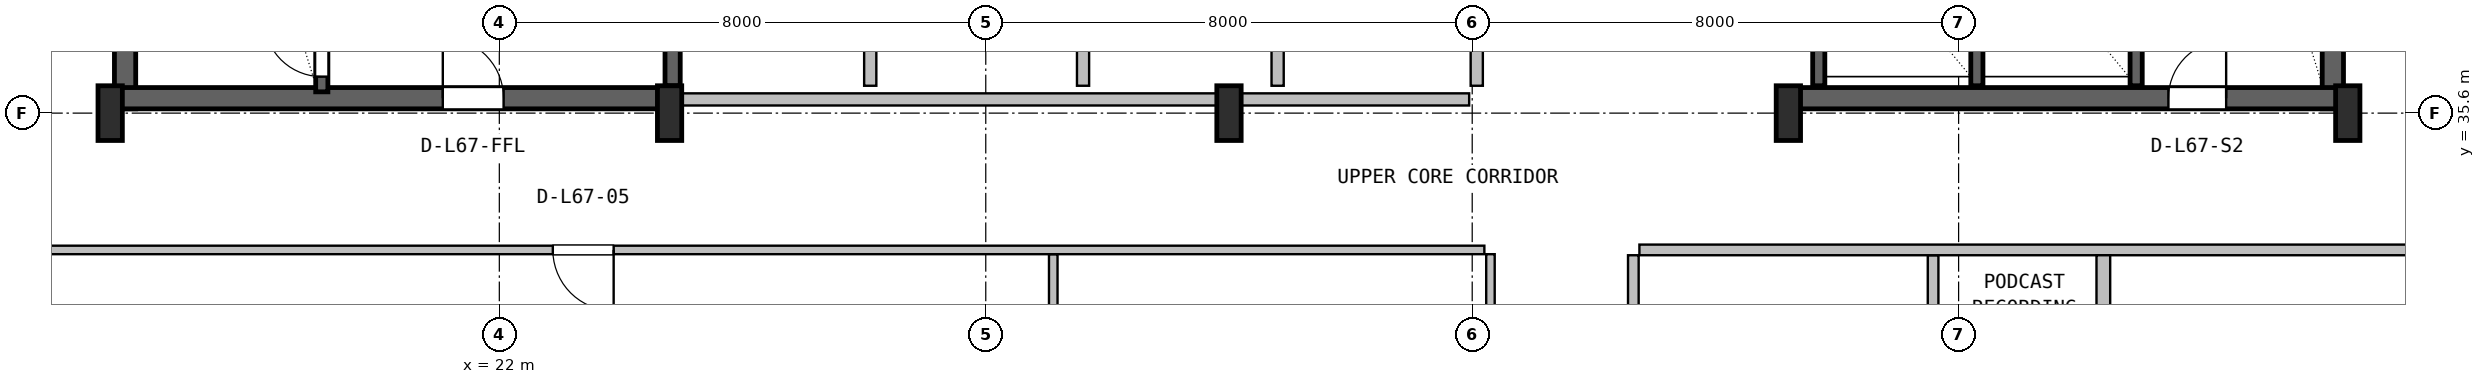
"""IFC4 building model, lengths in metres.
Left out: names, types, materials, properties, quantities, classifications, styles, units other than length and angle.
Written with IfcOpenShell. Run it as: python <this file> out.ifc"""

import sys

from ifc_helpers import new_model, si_unit, direction, frame, frame_2d, origin, origin_2d, place, context, subcontext, project, spatial, rectangle, i_section, extrude, source, transform, mapped, element, fill, save


model = new_model("IFC4")
c1 = context("Model", 3, precision=1e-05, world=origin(), true_north=direction((0.0, 1.0)))
c2 = subcontext(c1, "Body", "Model", "MODEL_VIEW")
j1 = project(units=[si_unit("LENGTHUNIT", "METRE"), si_unit("PLANEANGLEUNIT", "RADIAN")], contexts=[c1])
p1 = place(None, origin())
s1 = spatial("IfcSite", under=j1, at=p1, CompositionType="ELEMENT")
p2 = place(p1, origin())
s2 = spatial("IfcBuilding", under=s1, at=p2, CompositionType="ELEMENT")
p3 = place(p2, frame((0.0, 0.0, 269.8)))
s3 = spatial("IfcBuildingStorey", under=s2, at=p3, CompositionType="ELEMENT", Elevation=269.8)
for number, where, z_axis, x_axis in (
    (1, (15.845, 35.67, 0.0), (0.0, 0.0, 1.0), (0.0, 1.0, 0.0)),
    (2, (52.155, 35.67, 0.0), (0.0, 0.0, 1.0), (0.0, 1.0, 0.0)),
):
    element("IfcWall", number, at=place(p3, frame(where, z_axis=z_axis, x_axis=x_axis)), inside=s3, PredefinedType="SHEAR", context=c2, shape_type="SweptSolid", body=[
        extrude(rectangle(XDim=11.13, YDim=0.35, at=frame_2d((5.565, 0.0))), origin(), (0.0, 0.0, 1.0), 3.55),
    ])
p4 = place(p3, frame((15.67, 35.845, 0.0), z_axis=(0.0, 0.0, 1.0), x_axis=(1.0, 0.0, 0.0)))
e3 = element("IfcWall", 3, at=p4, inside=s3, PredefinedType="SHEAR", context=c2, shape_type="SweptSolid", body=[
    extrude(rectangle(XDim=9.13, YDim=0.35, at=frame_2d((4.565, 0.0))), origin(), (0.0, 0.0, 1.0), 3.55),
])
p5 = place(p4, frame((5.4, 0.0, 0.0)))
e4 = element("IfcOpeningElement", 4, at=p5, cuts=e3, PredefinedType="OPENING", context=c2, shape_type="SweptSolid", body=[
    extrude(rectangle(XDim=1.0, YDim=2.1, at=frame_2d((0.5, 1.05))), frame((0.0, 0.185, 0.0), z_axis=(0.0, -1.0, 0.0), x_axis=(1.0, 0.0, 0.0)), (0.0, 0.0, 1.0), 0.37),
])
p6 = place(p3, frame((43.2, 35.845, 0.0), z_axis=(0.0, 0.0, 1.0), x_axis=(1.0, 0.0, 0.0)))
e5 = element("IfcWall", 5, at=p6, inside=s3, PredefinedType="SHEAR", context=c2, shape_type="SweptSolid", body=[
    extrude(rectangle(XDim=9.13, YDim=0.35, at=frame_2d((4.565, 0.0))), origin(), (0.0, 0.0, 1.0), 3.55),
])
p7 = place(p6, frame((6.25, 0.0, 0.0)))
e6 = element("IfcOpeningElement", 6, at=p7, cuts=e5, PredefinedType="OPENING", context=c2, shape_type="SweptSolid", body=[
    extrude(rectangle(XDim=0.95, YDim=2.1, at=frame_2d((0.475, 1.05))), frame((0.0, 0.185, 0.0), z_axis=(0.0, -1.0, 0.0), x_axis=(1.0, 0.0, 0.0)), (0.0, 0.0, 1.0), 0.37),
])
m1 = source(origin(), c2, "Body", "SweptSolid", [
    extrude(i_section(OverallWidth=0.4, OverallDepth=0.9, WebThickness=0.016, FlangeThickness=0.028, FilletRadius=0.016, at=origin_2d()), origin(), (0.0, 0.0, 1.0), 3.8),
])
for number, where, z_axis, x_axis in (
    (7, (15.6, 35.6, 0.0), (0.0, 0.0, 1.0), (1.0, 0.0, 0.0)),
    (8, (24.8, 35.6, 0.0), (0.0, 0.0, 1.0), (1.0, 0.0, 0.0)),
    (9, (34.0, 35.6, 0.0), (0.0, 0.0, 1.0), (1.0, 0.0, 0.0)),
    (10, (43.2, 35.6, 0.0), (0.0, 0.0, 1.0), (1.0, 0.0, 0.0)),
    (11, (52.4, 35.6, 0.0), (0.0, 0.0, 1.0), (1.0, 0.0, 0.0)),
):
    element("IfcColumn", number, at=place(p3, frame(where, z_axis=z_axis, x_axis=x_axis)), inside=s3, PredefinedType="COLUMN", context=c2, shape_type="MappedRepresentation", body=[
        mapped(m1, transform((0.0, 0.0, 0.0), x_axis=(1.0, 0.0, 0.0), y_axis=(0.0, 1.0, 0.0), z_axis=(0.0, 0.0, 1.0), scale=1.0)),
    ])
p8 = place(p3, frame((19.08, 35.95, 0.0), z_axis=(0.0, 0.0, 1.0), x_axis=(0.0, 1.0, 0.0)))
e12 = element("IfcWall", 12, at=p8, inside=s3, PredefinedType="SHEAR", context=c2, shape_type="SweptSolid", body=[
    extrude(rectangle(XDim=9.65, YDim=0.2, at=frame_2d((4.825, 0.0))), origin(), (0.0, 0.0, 1.0), 3.55),
])
p9 = place(p8, frame((0.25, 0.0, 0.0)))
e13 = element("IfcOpeningElement", 13, at=p9, cuts=e12, PredefinedType="OPENING", context=c2, shape_type="SweptSolid", body=[
    extrude(rectangle(XDim=0.95, YDim=2.1, at=frame_2d((0.475, 1.05))), frame((0.0, 0.11, 0.0), z_axis=(0.0, -1.0, 0.0), x_axis=(1.0, 0.0, 0.0)), (0.0, 0.0, 1.0), 0.22),
])
p10 = place(p3, frame((24.85, 36.05, 0.0), z_axis=(0.0, 0.0, 1.0), x_axis=(0.0, 1.0, 0.0)))
e14 = element("IfcWall", 14, at=p10, inside=s3, PredefinedType="SHEAR", context=c2, shape_type="SweptSolid", body=[
    extrude(rectangle(XDim=10.45, YDim=0.25, at=frame_2d((5.225, 0.0))), origin(), (0.0, 0.0, 1.0), 3.55),
])
p11 = place(p3, frame((48.92, 36.05, 0.0), z_axis=(0.0, 0.0, 1.0), x_axis=(0.0, 1.0, 0.0)))
e15 = element("IfcWall", 15, at=p11, inside=s3, PredefinedType="SHEAR", context=c2, shape_type="SweptSolid", body=[
    extrude(rectangle(XDim=10.5, YDim=0.2, at=frame_2d((5.25, 0.0))), origin(), (0.0, 0.0, 1.0), 3.55),
])
for number, where, z_axis, x_axis in (
    (16, (43.7, 36.05, 0.0), (0.0, 0.0, 1.0), (0.0, 1.0, 0.0)),
    (17, (46.3, 36.05, 0.0), (0.0, 0.0, 1.0), (0.0, 1.0, 0.0)),
):
    element("IfcWall", number, at=place(p3, frame(where, z_axis=z_axis, x_axis=x_axis)), inside=s3, PredefinedType="SHEAR", context=c2, shape_type="SweptSolid", body=[
        extrude(rectangle(XDim=3.05, YDim=0.2, at=frame_2d((1.525, 0.0))), origin(), (0.0, 0.0, 1.0), 3.55),
    ])
p12 = place(p3, frame((25.0, 35.825, 0.0), z_axis=(0.0, 0.0, 1.0), x_axis=(1.0, 0.0, 0.0)))
e18 = element("IfcWall", 18, at=p12, inside=s3, PredefinedType="SOLIDWALL", context=c2, shape_type="SweptSolid", body=[
    extrude(rectangle(XDim=12.95, YDim=0.2, at=frame_2d((6.475, 0.0))), origin(), (0.0, 0.0, 1.0), 2.575),
])
for number, where, z_axis, x_axis in (
    (19, (28.1, 36.05, 0.0), (0.0, 0.0, 1.0), (0.0, 1.0, 0.0)),
    (20, (31.6, 36.05, 0.0), (0.0, 0.0, 1.0), (0.0, 1.0, 0.0)),
):
    element("IfcWall", number, at=place(p3, frame(where, z_axis=z_axis, x_axis=x_axis)), inside=s3, PredefinedType="PLUMBINGWALL", context=c2, shape_type="SweptSolid", body=[
        extrude(rectangle(XDim=3.1, YDim=0.2, at=frame_2d((1.55, 0.0))), origin(), (0.0, 0.0, 1.0), 3.53),
    ])
for number, where, z_axis, x_axis in (
    (21, (34.8, 36.05, 0.0), (0.0, 0.0, 1.0), (0.0, 1.0, 0.0)),
    (22, (38.075, 36.05, 0.0), (0.0, 0.0, 1.0), (0.0, 1.0, 0.0)),
):
    element("IfcWall", number, at=place(p3, frame(where, z_axis=z_axis, x_axis=x_axis)), inside=s3, PredefinedType="SOLIDWALL", context=c2, shape_type="SweptSolid", body=[
        extrude(rectangle(XDim=3.1, YDim=0.2, at=frame_2d((1.55, 0.0))), origin(), (0.0, 0.0, 1.0), 3.53),
    ])
p13 = place(p3, frame((38.3, 13.38, 0.0), z_axis=(0.0, 0.0, 1.0), x_axis=(0.0, 1.0, 0.0)))
e23 = element("IfcWall", 23, at=p13, inside=s3, PredefinedType="PARTITIONING", context=c2, shape_type="SweptSolid", body=[
    extrude(rectangle(XDim=19.9, YDim=0.14, at=frame_2d((9.95, 0.0))), origin(), (0.0, 0.0, 1.0), 2.981),
])
p14 = place(p13, frame((12.545, 0.0, 0.0)))
e24 = element("IfcOpeningElement", 24, at=p14, cuts=e23, PredefinedType="OPENING", context=c2, shape_type="SweptSolid", body=[
    extrude(rectangle(XDim=1.4, YDim=2.12, at=frame_2d((0.7, 1.06))), frame((0.0, 0.08, 0.0), z_axis=(0.0, -1.0, 0.0), x_axis=(1.0, 0.0, 0.0)), (0.0, 0.0, 1.0), 0.16),
])
p15 = place(p3, frame((31.11, 19.87, 0.0), z_axis=(0.0, 0.0, 1.0), x_axis=(0.0, 1.0, 0.0)))
e25 = element("IfcWall", 25, at=p15, inside=s3, PredefinedType="PARTITIONING", context=c2, shape_type="SweptSolid", body=[
    extrude(rectangle(XDim=13.41, YDim=0.14, at=frame_2d((6.705, 0.0))), origin(), (0.0, 0.0, 1.0), 2.981),
])
p16 = place(p3, frame((12.18, 33.35, 0.0), z_axis=(0.0, 0.0, 1.0), x_axis=(1.0, 0.0, 0.0)))
e26 = element("IfcWall", 26, at=p16, inside=s3, PredefinedType="PARTITIONING", context=c2, shape_type="SweptSolid", body=[
    extrude(rectangle(XDim=26.02, YDim=0.14, at=frame_2d((13.01, 0.0))), origin(), (0.0, 0.0, 1.0), 2.981),
])
p17 = place(p16, frame((10.7, 0.0, 0.0)))
e27 = element("IfcOpeningElement", 27, at=p17, cuts=e26, PredefinedType="OPENING", context=c2, shape_type="SweptSolid", body=[
    extrude(rectangle(XDim=1.0, YDim=2.1, at=frame_2d((0.5, 1.05))), frame((0.0, 0.08, 0.0), z_axis=(0.0, -1.0, 0.0), x_axis=(1.0, 0.0, 0.0)), (0.0, 0.0, 1.0), 0.16),
])
p18 = place(p3, frame((45.58, 29.167, 0.0), z_axis=(0.0, 0.0, 1.0), x_axis=(0.0, 1.0, 0.0)))
e28 = element("IfcWall", 28, at=p18, inside=s3, PredefinedType="PARTITIONING", context=c2, shape_type="SweptSolid", body=[
    extrude(rectangle(XDim=4.096, YDim=0.175, at=frame_2d((2.048, 0.0))), origin(), (0.0, 0.0, 1.0), 3.53),
])
p19 = place(p3, frame((40.75, 33.35, 0.0), z_axis=(0.0, 0.0, 1.0), x_axis=(1.0, 0.0, 0.0)))
e29 = element("IfcWall", 29, at=p19, inside=s3, PredefinedType="PARTITIONING", context=c2, shape_type="SweptSolid", body=[
    extrude(rectangle(XDim=15.07, YDim=0.175, at=frame_2d((7.535, 0.0))), origin(), (0.0, 0.0, 1.0), 2.981),
])
p20 = place(p3, frame((40.65, 29.167, 0.0), z_axis=(0.0, 0.0, 1.0), x_axis=(0.0, 1.0, 0.0)))
e30 = element("IfcWall", 30, at=p20, inside=s3, PredefinedType="PARTITIONING", context=c2, shape_type="SweptSolid", body=[
    extrude(rectangle(XDim=4.096, YDim=0.175, at=frame_2d((2.048, 0.0))), origin(), (0.0, 0.0, 1.0), 3.53),
])
p21 = place(p3, frame((48.38, 29.167, 0.0), z_axis=(0.0, 0.0, 1.0), x_axis=(0.0, 1.0, 0.0)))
e31 = element("IfcWall", 31, at=p21, inside=s3, PredefinedType="PARTITIONING", context=c2, shape_type="SweptSolid", body=[
    extrude(rectangle(XDim=4.096, YDim=0.225, at=frame_2d((2.048, 0.0))), origin(), (0.0, 0.0, 1.0), 3.53),
])
m2 = source(origin(), c2, "Body", "SweptSolid", [
    extrude(rectangle(XDim=0.95, YDim=2.1, at=frame_2d((0.475, 1.05))), frame((0.0, 0.025, 0.0), z_axis=(0.0, -1.0, 0.0), x_axis=(1.0, 0.0, 0.0)), (0.0, 0.0, 1.0), 0.05),
])
p22 = place(p9, origin())
e32 = element("IfcDoor", 32, at=p22, inside=s3, OperationType="SINGLE_SWING_RIGHT", PredefinedType="DOOR", context=c2, shape_type="MappedRepresentation", body=[
    mapped(m2, transform((0.0, 0.0, 0.0), x_axis=(1.0, 0.0, 0.0), y_axis=(0.0, 1.0, 0.0), z_axis=(0.0, 0.0, 1.0), scale=1.0)),
])
fill(e13, e32)
m3 = source(origin(), c2, "Body", "SweptSolid", [
    extrude(rectangle(XDim=1.0, YDim=2.1, at=frame_2d((0.5, 1.05))), frame((0.0, 0.025, 0.0), z_axis=(0.0, -1.0, 0.0), x_axis=(1.0, 0.0, 0.0)), (0.0, 0.0, 1.0), 0.05),
])
p23 = place(p5, origin())
e33 = element("IfcDoor", 33, at=p23, inside=s3, OperationType="SINGLE_SWING_LEFT", PredefinedType="DOOR", context=c2, shape_type="MappedRepresentation", body=[
    mapped(m3, transform((0.0, 0.0, 0.0), x_axis=(1.0, 0.0, 0.0), y_axis=(0.0, 1.0, 0.0), z_axis=(0.0, 0.0, 1.0), scale=1.0)),
])
fill(e4, e33)
p24 = place(p7, origin())
e34 = element("IfcDoor", 34, at=p24, inside=s3, OperationType="SINGLE_SWING_RIGHT", PredefinedType="DOOR", context=c2, shape_type="MappedRepresentation", body=[
    mapped(m2, transform((0.0, 0.0, 0.0), x_axis=(1.0, 0.0, 0.0), y_axis=(0.0, 1.0, 0.0), z_axis=(0.0, 0.0, 1.0), scale=1.0)),
])
fill(e6, e34)
m4 = source(origin(), c2, "Body", "SweptSolid", [
    extrude(rectangle(XDim=1.0, YDim=2.1, at=frame_2d((0.5, 1.05))), frame((0.0, 0.025, 0.0), z_axis=(0.0, -1.0, 0.0), x_axis=(1.0, 0.0, 0.0)), (0.0, 0.0, 1.0), 0.05),
])
p25 = place(p17, frame((1.0, 0.0, 0.0), z_axis=(0.0, 0.0, 1.0), x_axis=(-1.0, 0.0, 0.0)))
e35 = element("IfcDoor", 35, at=p25, inside=s3, OperationType="SINGLE_SWING_RIGHT", PredefinedType="DOOR", context=c2, shape_type="MappedRepresentation", body=[
    mapped(m4, transform((0.0, 0.0, 0.0), x_axis=(1.0, 0.0, 0.0), y_axis=(0.0, 1.0, 0.0), z_axis=(0.0, 0.0, 1.0), scale=1.0)),
])
fill(e27, e35)
save(model, sys.argv[1])
